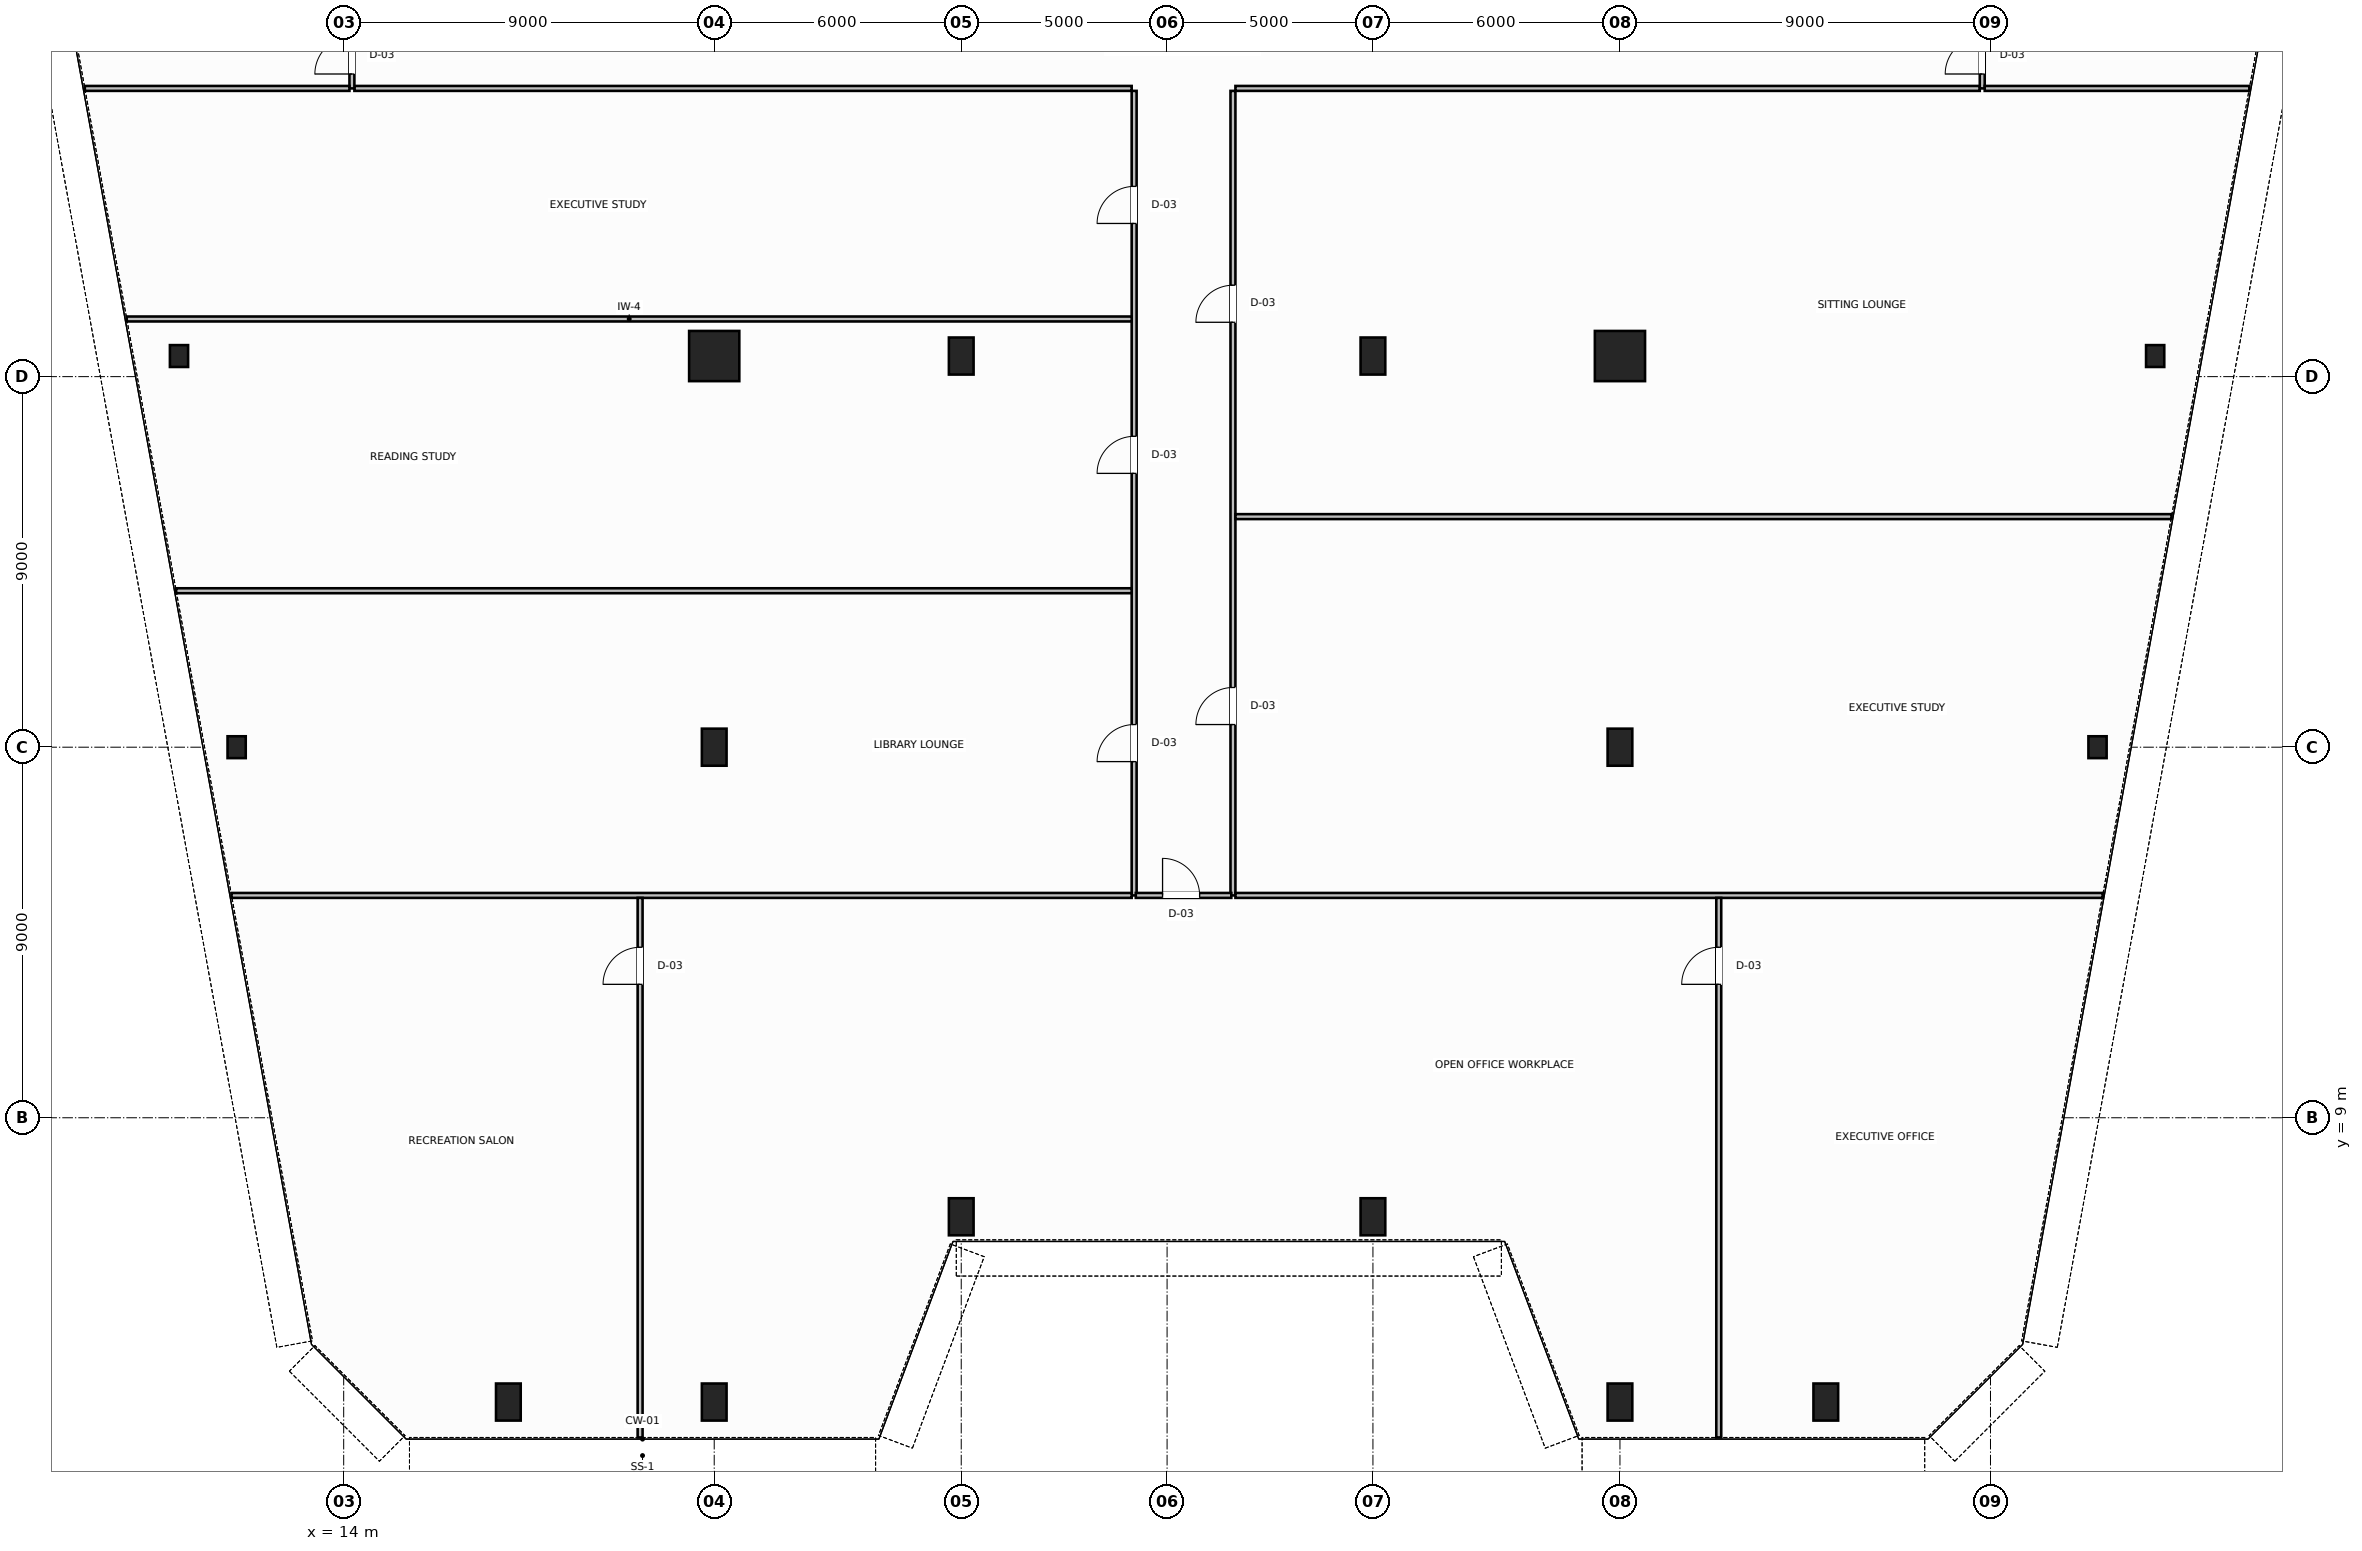
"""IFC4 building model, lengths in metres.
Left out: names, types, materials, properties, quantities, classifications, styles, units other than length and angle.
Written with IfcOpenShell. Run it as: python <this file> out.ifc"""

import sys

from ifc_helpers import new_model, si_unit, direction, frame, frame_2d, origin, origin_2d, place, context, subcontext, project, spatial, rectangle, hollow_rectangle, hollow_circle, i_section, extrude, source, transform, mapped, element, fill, save


model = new_model("IFC4")
c1 = context("Model", 3, precision=1e-05, world=origin(), true_north=direction((0.0, 1.0)))
c2 = subcontext(c1, "Body", "Model", "MODEL_VIEW")
j1 = project(units=[si_unit("LENGTHUNIT", "METRE"), si_unit("PLANEANGLEUNIT", "RADIAN")], contexts=[c1])
p1 = place(None, origin())
s1 = spatial("IfcSite", under=j1, at=p1, CompositionType="ELEMENT")
p2 = place(p1, origin())
s2 = spatial("IfcBuilding", under=s1, at=p2, CompositionType="ELEMENT")
p3 = place(p2, frame((0.0, 0.0, 37.8)))
s3 = spatial("IfcBuildingStorey", under=s2, at=p3, CompositionType="ELEMENT", Elevation=37.8)
m1 = source(origin(), c2, "Body", "SweptSolid", [
    extrude(i_section(OverallWidth=0.442, OverallDepth=0.531, WebThickness=0.065, FlangeThickness=0.076, FilletRadius=0.015, at=origin_2d()), origin(), (0.0, 0.0, 1.0), 3.8),
])
for number, where, z_axis, x_axis in (
    (1, (10.0, 27.5, 0.0), (0.0, 0.0, 1.0), (1.0, 0.0, 0.0)),
    (2, (11.4, 18.0, 0.0), (0.0, 0.0, 1.0), (1.0, 0.0, 0.0)),
    (3, (58.0, 27.5, 0.0), (0.0, 0.0, 1.0), (1.0, 0.0, 0.0)),
    (4, (56.6, 18.0, 0.0), (0.0, 0.0, 1.0), (1.0, 0.0, 0.0)),
):
    element("IfcColumn", number, at=place(p3, frame(where, z_axis=z_axis, x_axis=x_axis)), inside=s3, PredefinedType="COLUMN", context=c2, shape_type="MappedRepresentation", body=[
        mapped(m1, transform((0.0, 0.0, 0.0), scale=1.0)),
    ])
m2 = source(origin(), c2, "Body", "SweptSolid", [
    extrude(hollow_circle(Radius=0.61, WallThickness=0.05, at=origin_2d()), origin(), (0.0, 0.0, 1.0), 3.8),
])
p4 = place(p3, frame((23.0, 27.5, 0.0), z_axis=(0.0, 0.0, 1.0), x_axis=(1.0, 0.0, 0.0)))
e5 = element("IfcColumn", 5, at=p4, inside=s3, PredefinedType="COLUMN", context=c2, shape_type="MappedRepresentation", body=[
    mapped(m2, transform((0.0, 0.0, 0.0), scale=1.0)),
])
m3 = source(origin(), c2, "Body", "SweptSolid", [
    extrude(hollow_rectangle(XDim=0.6, YDim=0.9, WallThickness=0.04, InnerFilletRadius=0.04, OuterFilletRadius=0.08, at=origin_2d()), origin(), (0.0, 0.0, 1.0), 3.8),
])
for number, where, z_axis, x_axis in (
    (6, (29.0, 27.5, 0.0), (0.0, 0.0, 1.0), (1.0, 0.0, 0.0)),
    (7, (39.0, 27.5, 0.0), (0.0, 0.0, 1.0), (1.0, 0.0, 0.0)),
):
    element("IfcColumn", number, at=place(p3, frame(where, z_axis=z_axis, x_axis=x_axis)), inside=s3, PredefinedType="COLUMN", context=c2, shape_type="MappedRepresentation", body=[
        mapped(m3, transform((0.0, 0.0, 0.0), scale=1.0)),
    ])
p5 = place(p3, frame((45.0, 27.5, 0.0), z_axis=(0.0, 0.0, 1.0), x_axis=(1.0, 0.0, 0.0)))
e8 = element("IfcColumn", 8, at=p5, inside=s3, PredefinedType="COLUMN", context=c2, shape_type="MappedRepresentation", body=[
    mapped(m2, transform((0.0, 0.0, 0.0), scale=1.0)),
])
for number, where, z_axis, x_axis in (
    (9, (23.0, 18.0, 0.0), (0.0, 0.0, 1.0), (1.0, 0.0, 0.0)),
    (10, (45.0, 18.0, 0.0), (0.0, 0.0, 1.0), (1.0, 0.0, 0.0)),
):
    element("IfcColumn", number, at=place(p3, frame(where, z_axis=z_axis, x_axis=x_axis)), inside=s3, PredefinedType="COLUMN", context=c2, shape_type="MappedRepresentation", body=[
        mapped(m3, transform((0.0, 0.0, 0.0), scale=1.0)),
    ])
m4 = source(origin(), c2, "Body", "SweptSolid", [
    extrude(hollow_rectangle(XDim=0.6, YDim=0.9, WallThickness=0.04, InnerFilletRadius=0.04, OuterFilletRadius=0.08, at=origin_2d()), origin(), (0.0, 0.0, 1.0), 3.744),
])
for number, where, z_axis, x_axis in (
    (11, (18.0, 2.095, 0.032), (0.0, 0.064, 0.998), (-1.0, 0.0, 0.0)),
    (12, (23.0, 2.095, 0.032), (0.0, 0.064, 0.998), (-1.0, 0.0, 0.0)),
    (13, (29.0, 6.595, 0.032), (0.0, 0.064, 0.998), (-1.0, 0.0, 0.0)),
    (14, (39.0, 6.595, 0.032), (0.0, 0.064, 0.998), (-1.0, 0.0, 0.0)),
    (15, (45.0, 2.095, 0.032), (0.0, 0.064, 0.998), (-1.0, 0.0, 0.0)),
    (16, (50.0, 2.095, 0.032), (0.0, 0.064, 0.998), (-1.0, 0.0, 0.0)),
):
    element("IfcColumn", number, at=place(p3, frame(where, z_axis=z_axis, x_axis=x_axis)), inside=s3, PredefinedType="COLUMN", context=c2, shape_type="MappedRepresentation", body=[
        mapped(m4, transform((0.0, 0.0, 0.0), scale=1.0)),
    ])
p6 = place(p3, frame((14.26, 34.0, 0.0), z_axis=(0.0, 0.0, 1.0), x_axis=(1.0, 0.0, 0.0)))
e17 = element("IfcWall", 17, at=p6, inside=s3, PredefinedType="PARTITIONING", context=c2, shape_type="SweptSolid", body=[
    extrude(rectangle(XDim=18.88, YDim=0.12, at=frame_2d((9.44, 0.0))), origin(), (0.0, 0.0, 1.0), 3.58),
])
p7 = place(p3, frame((35.66, 34.0, 0.0), z_axis=(0.0, 0.0, 1.0), x_axis=(1.0, 0.0, 0.0)))
e18 = element("IfcWall", 18, at=p7, inside=s3, PredefinedType="PARTITIONING", context=c2, shape_type="SweptSolid", body=[
    extrude(rectangle(XDim=18.08, YDim=0.12, at=frame_2d((9.04, 0.0))), origin(), (0.0, 0.0, 1.0), 3.58),
])
p8 = place(p3, frame((14.2, 34.0, 0.0), z_axis=(0.0, 0.0, 1.0), x_axis=(0.0, 1.0, 0.0)))
e19 = element("IfcWall", 19, at=p8, inside=s3, PredefinedType="PARTITIONING", context=c2, shape_type="SweptSolid", body=[
    extrude(rectangle(XDim=2.44, YDim=0.12, at=frame_2d((1.22, 0.0))), origin(), (0.0, 0.0, 1.0), 3.58),
])
p9 = place(p8, frame((0.35, 0.0, 0.0)))
e20 = element("IfcOpeningElement", 20, at=p9, cuts=e19, PredefinedType="OPENING", context=c2, shape_type="SweptSolid", body=[
    extrude(rectangle(XDim=0.9, YDim=2.15, at=frame_2d((0.45, 1.075))), frame((0.0, 0.07, 0.0), z_axis=(0.0, -1.0, 0.0), x_axis=(1.0, 0.0, 0.0)), (0.0, 0.0, 1.0), 0.14),
])
p10 = place(p3, frame((53.8, 34.0, 0.0), z_axis=(0.0, 0.0, 1.0), x_axis=(0.0, 1.0, 0.0)))
e21 = element("IfcWall", 21, at=p10, inside=s3, PredefinedType="PARTITIONING", context=c2, shape_type="SweptSolid", body=[
    extrude(rectangle(XDim=2.44, YDim=0.12, at=frame_2d((1.22, 0.0))), origin(), (0.0, 0.0, 1.0), 3.58),
])
p11 = place(p10, frame((0.35, 0.0, 0.0)))
e22 = element("IfcOpeningElement", 22, at=p11, cuts=e21, PredefinedType="OPENING", context=c2, shape_type="SweptSolid", body=[
    extrude(rectangle(XDim=0.9, YDim=2.15, at=frame_2d((0.45, 1.075))), frame((0.0, 0.07, 0.0), z_axis=(0.0, -1.0, 0.0), x_axis=(1.0, 0.0, 0.0)), (0.0, 0.0, 1.0), 0.14),
])
p12 = place(p3, frame((33.2, 14.4, 0.0), z_axis=(0.0, 0.0, 1.0), x_axis=(0.0, 1.0, 0.0)))
e23 = element("IfcWall", 23, at=p12, inside=s3, PredefinedType="PARTITIONING", context=c2, shape_type="SweptSolid", body=[
    extrude(rectangle(XDim=19.54, YDim=0.12, at=frame_2d((9.77, 0.0))), origin(), (0.0, 0.0, 1.0), 3.58),
])
p13 = place(p12, frame((3.25, 0.0, 0.0)))
e24 = element("IfcOpeningElement", 24, at=p13, cuts=e23, PredefinedType="OPENING", context=c2, shape_type="SweptSolid", body=[
    extrude(rectangle(XDim=0.9, YDim=2.15, at=frame_2d((0.45, 1.075))), frame((0.0, 0.07, 0.0), z_axis=(0.0, -1.0, 0.0), x_axis=(1.0, 0.0, 0.0)), (0.0, 0.0, 1.0), 0.14),
])
p14 = place(p12, frame((10.25, 0.0, 0.0)))
e25 = element("IfcOpeningElement", 25, at=p14, cuts=e23, PredefinedType="OPENING", context=c2, shape_type="SweptSolid", body=[
    extrude(rectangle(XDim=0.9, YDim=2.15, at=frame_2d((0.45, 1.075))), frame((0.0, 0.07, 0.0), z_axis=(0.0, -1.0, 0.0), x_axis=(1.0, 0.0, 0.0)), (0.0, 0.0, 1.0), 0.14),
])
p15 = place(p12, frame((16.32, 0.0, 0.0)))
e26 = element("IfcOpeningElement", 26, at=p15, cuts=e23, PredefinedType="OPENING", context=c2, shape_type="SweptSolid", body=[
    extrude(rectangle(XDim=0.9, YDim=2.15, at=frame_2d((0.45, 1.075))), frame((0.0, 0.07, 0.0), z_axis=(0.0, -1.0, 0.0), x_axis=(1.0, 0.0, 0.0)), (0.0, 0.0, 1.0), 0.14),
])
p16 = place(p3, frame((35.6, 14.4, 0.0), z_axis=(0.0, 0.0, 1.0), x_axis=(0.0, 1.0, 0.0)))
e27 = element("IfcWall", 27, at=p16, inside=s3, PredefinedType="PARTITIONING", context=c2, shape_type="SweptSolid", body=[
    extrude(rectangle(XDim=19.54, YDim=0.12, at=frame_2d((9.77, 0.0))), origin(), (0.0, 0.0, 1.0), 3.58),
])
p17 = place(p16, frame((4.15, 0.0, 0.0)))
e28 = element("IfcOpeningElement", 28, at=p17, cuts=e27, PredefinedType="OPENING", context=c2, shape_type="SweptSolid", body=[
    extrude(rectangle(XDim=0.9, YDim=2.15, at=frame_2d((0.45, 1.075))), frame((0.0, 0.07, 0.0), z_axis=(0.0, -1.0, 0.0), x_axis=(1.0, 0.0, 0.0)), (0.0, 0.0, 1.0), 0.14),
])
p18 = place(p16, frame((13.92, 0.0, 0.0)))
e29 = element("IfcOpeningElement", 29, at=p18, cuts=e27, PredefinedType="OPENING", context=c2, shape_type="SweptSolid", body=[
    extrude(rectangle(XDim=0.9, YDim=2.15, at=frame_2d((0.45, 1.075))), frame((0.0, 0.07, 0.0), z_axis=(0.0, -1.0, 0.0), x_axis=(1.0, 0.0, 0.0)), (0.0, 0.0, 1.0), 0.14),
])
p19 = place(p3, frame((33.24, 14.4, 0.0), z_axis=(0.0, 0.0, 1.0), x_axis=(1.0, 0.0, 0.0)))
e30 = element("IfcWall", 30, at=p19, inside=s3, PredefinedType="PARTITIONING", context=c2, shape_type="SweptSolid", body=[
    extrude(rectangle(XDim=2.32, YDim=0.12, at=frame_2d((1.16, 0.0))), origin(), (0.0, 0.0, 1.0), 3.58),
])
p20 = place(p19, frame((0.65, 0.0, 0.0)))
e31 = element("IfcOpeningElement", 31, at=p20, cuts=e30, PredefinedType="OPENING", context=c2, shape_type="SweptSolid", body=[
    extrude(rectangle(XDim=0.9, YDim=2.15, at=frame_2d((0.45, 1.075))), frame((0.0, 0.07, 0.0), z_axis=(0.0, -1.0, 0.0), x_axis=(1.0, 0.0, 0.0)), (0.0, 0.0, 1.0), 0.14),
])
for number, where, z_axis, x_axis in (
    (32, (7.712, 34.0, 0.0), (0.0, 0.0, 1.0), (1.0, 0.0, 0.0)),
    (33, (53.86, 34.0, 0.0), (0.0, 0.0, 1.0), (1.0, 0.0, 0.0)),
):
    element("IfcWall", number, at=place(p3, frame(where, z_axis=z_axis, x_axis=x_axis)), inside=s3, PredefinedType="PARTITIONING", context=c2, shape_type="SweptSolid", body=[
        extrude(rectangle(XDim=6.427, YDim=0.12, at=frame_2d((3.214, 0.0))), origin(), (0.0, 0.0, 1.0), 3.58),
    ])
p21 = place(p3, frame((9.93, 21.8, 0.0), z_axis=(0.0, 0.0, 1.0), x_axis=(1.0, 0.0, 0.0)))
e34 = element("IfcWall", 34, at=p21, inside=s3, PredefinedType="PARTITIONING", context=c2, shape_type="SweptSolid", body=[
    extrude(rectangle(XDim=23.21, YDim=0.12, at=frame_2d((11.605, 0.0))), origin(), (0.0, 0.0, 1.0), 3.58),
])
p22 = place(p3, frame((8.73, 28.4, 0.0), z_axis=(0.0, 0.0, 1.0), x_axis=(1.0, 0.0, 0.0)))
e35 = element("IfcWall", 35, at=p22, inside=s3, PredefinedType="PARTITIONING", context=c2, shape_type="SweptSolid", body=[
    extrude(rectangle(XDim=24.409, YDim=0.12, at=frame_2d((12.205, 0.0))), origin(), (0.0, 0.0, 1.0), 3.58),
])
p23 = place(p3, frame((35.66, 23.6, 0.0), z_axis=(0.0, 0.0, 1.0), x_axis=(1.0, 0.0, 0.0)))
e36 = element("IfcWall", 36, at=p23, inside=s3, PredefinedType="PARTITIONING", context=c2, shape_type="SweptSolid", body=[
    extrude(rectangle(XDim=22.737, YDim=0.12, at=frame_2d((11.369, 0.0))), origin(), (0.0, 0.0, 1.0), 3.58),
])
p24 = place(p3, frame((11.275, 14.4, 0.0), z_axis=(0.0, 0.0, 1.0), x_axis=(1.0, 0.0, 0.0)))
e37 = element("IfcWall", 37, at=p24, inside=s3, PredefinedType="PARTITIONING", context=c2, shape_type="SweptSolid", body=[
    extrude(rectangle(XDim=21.865, YDim=0.12, at=frame_2d((10.932, 0.0))), origin(), (0.0, 0.0, 1.0), 3.58),
])
p25 = place(p3, frame((35.66, 14.4, 0.0), z_axis=(0.0, 0.0, 1.0), x_axis=(1.0, 0.0, 0.0)))
e38 = element("IfcWall", 38, at=p25, inside=s3, PredefinedType="PARTITIONING", context=c2, shape_type="SweptSolid", body=[
    extrude(rectangle(XDim=21.065, YDim=0.12, at=frame_2d((10.532, 0.0))), origin(), (0.0, 0.0, 1.0), 3.58),
])
p26 = place(p3, frame((21.2, 1.235, 0.0), z_axis=(0.0, 0.0, 1.0), x_axis=(0.0, 1.0, 0.0)))
e39 = element("IfcWall", 39, at=p26, inside=s3, PredefinedType="PARTITIONING", context=c2, shape_type="SweptSolid", body=[
    extrude(rectangle(XDim=13.105, YDim=0.12, at=frame_2d((6.552, 0.0))), origin(), (0.0, 0.0, 1.0), 3.58),
])
p27 = place(p26, frame((11.005, 0.0, 0.0)))
e40 = element("IfcOpeningElement", 40, at=p27, cuts=e39, PredefinedType="OPENING", context=c2, shape_type="SweptSolid", body=[
    extrude(rectangle(XDim=0.9, YDim=2.15, at=frame_2d((0.45, 1.075))), frame((0.0, 0.07, 0.0), z_axis=(0.0, -1.0, 0.0), x_axis=(1.0, 0.0, 0.0)), (0.0, 0.0, 1.0), 0.14),
])
p28 = place(p3, frame((47.4, 1.235, 0.0), z_axis=(0.0, 0.0, 1.0), x_axis=(0.0, 1.0, 0.0)))
e41 = element("IfcWall", 41, at=p28, inside=s3, PredefinedType="PARTITIONING", context=c2, shape_type="SweptSolid", body=[
    extrude(rectangle(XDim=13.105, YDim=0.12, at=frame_2d((6.552, 0.0))), origin(), (0.0, 0.0, 1.0), 3.58),
])
p29 = place(p28, frame((11.005, 0.0, 0.0)))
e42 = element("IfcOpeningElement", 42, at=p29, cuts=e41, PredefinedType="OPENING", context=c2, shape_type="SweptSolid", body=[
    extrude(rectangle(XDim=0.9, YDim=2.15, at=frame_2d((0.45, 1.075))), frame((0.0, 0.07, 0.0), z_axis=(0.0, -1.0, 0.0), x_axis=(1.0, 0.0, 0.0)), (0.0, 0.0, 1.0), 0.14),
])
m5 = source(origin(), c2, "Body", "SweptSolid", [
    extrude(rectangle(XDim=0.9, YDim=2.15, at=frame_2d((0.45, 1.075))), frame((0.0, 0.025, 0.0), z_axis=(0.0, -1.0, 0.0), x_axis=(1.0, 0.0, 0.0)), (0.0, 0.0, 1.0), 0.05),
])
p30 = place(p9, origin())
e43 = element("IfcDoor", 43, at=p30, inside=s3, OperationType="SINGLE_SWING_LEFT", PredefinedType="DOOR", context=c2, shape_type="MappedRepresentation", body=[
    mapped(m5, transform((0.0, 0.0, 0.0), scale=1.0)),
])
fill(e20, e43)
p31 = place(p11, origin())
e44 = element("IfcDoor", 44, at=p31, inside=s3, OperationType="SINGLE_SWING_RIGHT", PredefinedType="DOOR", context=c2, shape_type="MappedRepresentation", body=[
    mapped(m5, transform((0.0, 0.0, 0.0), scale=1.0)),
])
fill(e22, e44)
p32 = place(p13, origin())
e45 = element("IfcDoor", 45, at=p32, inside=s3, OperationType="SINGLE_SWING_LEFT", PredefinedType="DOOR", context=c2, shape_type="MappedRepresentation", body=[
    mapped(m5, transform((0.0, 0.0, 0.0), scale=1.0)),
])
fill(e24, e45)
p33 = place(p14, origin())
e46 = element("IfcDoor", 46, at=p33, inside=s3, OperationType="SINGLE_SWING_RIGHT", PredefinedType="DOOR", context=c2, shape_type="MappedRepresentation", body=[
    mapped(m5, transform((0.0, 0.0, 0.0), scale=1.0)),
])
fill(e25, e46)
p34 = place(p15, origin())
e47 = element("IfcDoor", 47, at=p34, inside=s3, OperationType="SINGLE_SWING_LEFT", PredefinedType="DOOR", context=c2, shape_type="MappedRepresentation", body=[
    mapped(m5, transform((0.0, 0.0, 0.0), scale=1.0)),
])
fill(e26, e47)
p35 = place(p17, origin())
e48 = element("IfcDoor", 48, at=p35, inside=s3, OperationType="SINGLE_SWING_RIGHT", PredefinedType="DOOR", context=c2, shape_type="MappedRepresentation", body=[
    mapped(m5, transform((0.0, 0.0, 0.0), scale=1.0)),
])
fill(e28, e48)
p36 = place(p18, origin())
e49 = element("IfcDoor", 49, at=p36, inside=s3, OperationType="SINGLE_SWING_LEFT", PredefinedType="DOOR", context=c2, shape_type="MappedRepresentation", body=[
    mapped(m5, transform((0.0, 0.0, 0.0), scale=1.0)),
])
fill(e29, e49)
p37 = place(p27, origin())
e50 = element("IfcDoor", 50, at=p37, inside=s3, OperationType="SINGLE_SWING_RIGHT", PredefinedType="DOOR", context=c2, shape_type="MappedRepresentation", body=[
    mapped(m5, transform((0.0, 0.0, 0.0), scale=1.0)),
])
fill(e40, e50)
p38 = place(p20, origin())
e51 = element("IfcDoor", 51, at=p38, inside=s3, OperationType="SINGLE_SWING_LEFT", PredefinedType="DOOR", context=c2, shape_type="MappedRepresentation", body=[
    mapped(m5, transform((0.0, 0.0, 0.0), scale=1.0)),
])
fill(e31, e51)
p39 = place(p29, origin())
e52 = element("IfcDoor", 52, at=p39, inside=s3, OperationType="SINGLE_SWING_LEFT", PredefinedType="DOOR", context=c2, shape_type="MappedRepresentation", body=[
    mapped(m5, transform((0.0, 0.0, 0.0), scale=1.0)),
])
fill(e42, e52)
save(model, sys.argv[1])
